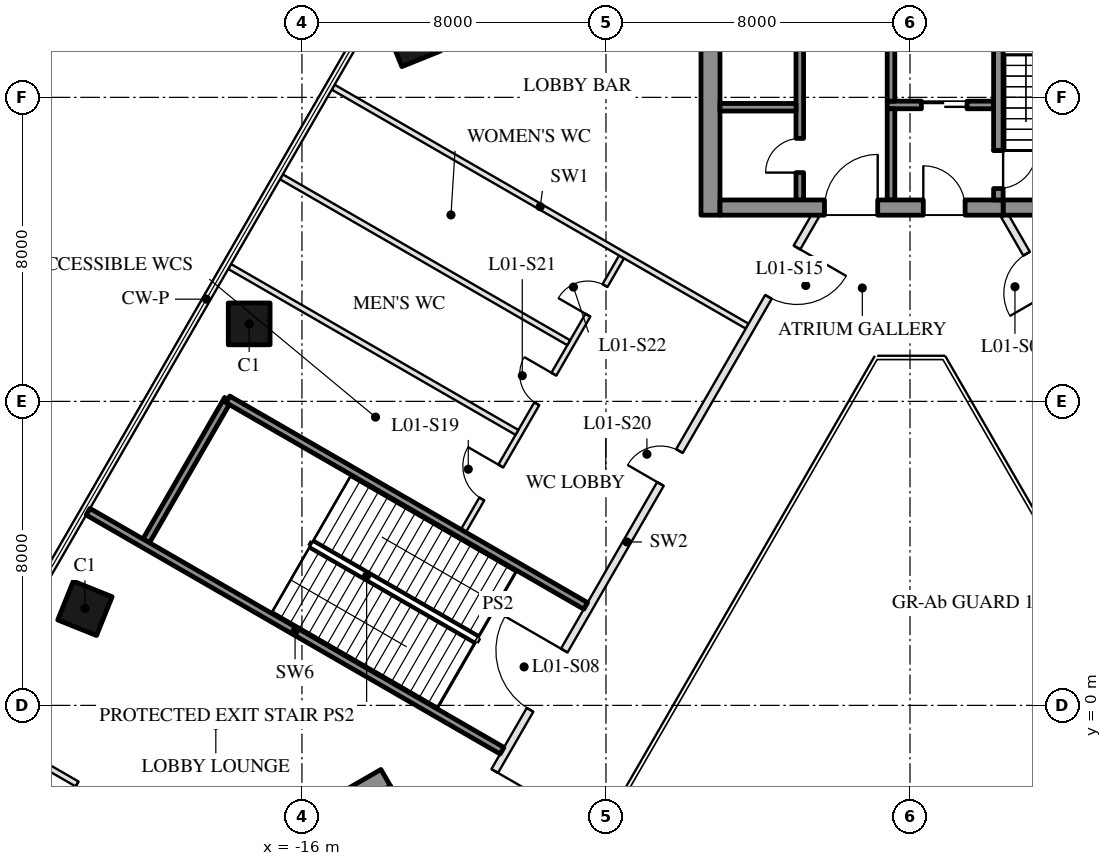
"""IFC4 building model, lengths in metres.
Left out: names, types, materials, properties, quantities, classifications, styles, units other than length and angle.
Written with IfcOpenShell. Run it as: python <this file> out.ifc"""

import sys

from ifc_helpers import new_model, si_unit, direction, frame, frame_2d, origin, origin_2d, place, context, subcontext, project, spatial, rectangle, hollow_rectangle, extrude, boolean, halfspace, element, fill, save


model = new_model("IFC4")
c1 = context("Model", 3, precision=1e-05, world=origin(), true_north=direction((0.0, 1.0)))
c2 = subcontext(c1, "Body", "Model", "MODEL_VIEW")
j1 = project(units=[si_unit("LENGTHUNIT", "METRE"), si_unit("PLANEANGLEUNIT", "RADIAN")], contexts=[c1])
p1 = place(None, origin())
s1 = spatial("IfcSite", under=j1, at=p1, CompositionType="ELEMENT")
p2 = place(p1, origin())
s2 = spatial("IfcBuilding", under=s1, at=p2, CompositionType="ELEMENT")
p3 = place(p2, frame((0.0, 0.0, 9.0)))
s3 = spatial("IfcBuildingStorey", under=s2, at=p3, CompositionType="ELEMENT", Elevation=9.0)
p4 = place(p3, frame((-13.066, 17.525, 0.0), z_axis=(0.075817777457, -0.096766445564, 0.992415195185), x_axis=(0.501683757676, 0.86383242032, 0.045901600061)))
e1 = element("IfcColumn", 1, at=p4, inside=s3, PredefinedType="COLUMN", context=c2, shape_type="SweptSolid", body=[
    boolean("DIFFERENCE", boolean("DIFFERENCE", extrude(hollow_rectangle(XDim=1.1, YDim=1.1, WallThickness=0.05, at=origin_2d()), origin(), (0.0, 0.0, 1.0), 6.55), halfspace(frame((0.0, 0.0, 0.017), z_axis=(0.0, 0.0, 1.0), x_axis=(1.0, 0.0, 0.0)), True)), halfspace(frame((0.0, 0.0, 6.534), z_axis=(0.0, 0.0, 1.0), x_axis=(1.0, 0.0, 0.0)), False)),
])
p5 = place(p3, frame((-17.388, 10.039, 0.0), z_axis=(0.098846347324, -0.057091321784, 0.993463628221), x_axis=(0.500071807692, 0.865983941567, 9.961389e-06)))
e2 = element("IfcColumn", 2, at=p5, inside=s3, PredefinedType="COLUMN", context=c2, shape_type="SweptSolid", body=[
    boolean("DIFFERENCE", boolean("DIFFERENCE", extrude(hollow_rectangle(XDim=1.1, YDim=1.1, WallThickness=0.05, at=origin_2d()), origin(), (0.0, 0.0, 1.0), 6.543), halfspace(frame((0.0, 0.0, 0.015), z_axis=(0.0, 0.0, 1.0), x_axis=(1.0, 0.0, 0.0)), True)), halfspace(frame((0.0, 0.0, 6.528), z_axis=(0.0, 0.0, 1.0), x_axis=(1.0, 0.0, 0.0)), False)),
])
p6 = place(p3, frame((-21.71, 2.553, 0.0), z_axis=(0.12170363311, -0.017295707738, 0.992415781909), x_axis=(-0.497292845598, -0.86636846087, 0.045885899002)))
e3 = element("IfcColumn", 3, at=p6, inside=s3, PredefinedType="COLUMN", context=c2, shape_type="SweptSolid", body=[
    boolean("DIFFERENCE", boolean("DIFFERENCE", extrude(hollow_rectangle(XDim=1.1, YDim=1.1, WallThickness=0.05, at=origin_2d()), origin(), (0.0, 0.0, 1.0), 6.55), halfspace(frame((0.0, 0.0, 0.017), z_axis=(0.0, 0.0, 1.0), x_axis=(1.0, 0.0, 0.0)), True)), halfspace(frame((0.0, 0.0, 6.534), z_axis=(0.0, 0.0, 1.0), x_axis=(1.0, 0.0, 0.0)), False)),
])
p7 = place(p3, frame((-5.25, 12.9, 0.0), z_axis=(0.0, 0.0, 1.0), x_axis=(0.0, 1.0, 0.0)))
e4 = element("IfcWall", 4, at=p7, inside=s3, PredefinedType="SHEAR", context=c2, shape_type="SweptSolid", body=[
    extrude(rectangle(XDim=15.6, YDim=0.5, at=frame_2d((7.8, 0.0))), origin(), (0.0, 0.0, 1.0), 6.15),
])
p8 = place(p3, frame((2.2, 15.8, 0.0), z_axis=(0.0, 0.0, 1.0), x_axis=(-1.0, 0.0, 0.0)))
e5 = element("IfcWall", 5, at=p8, inside=s3, PredefinedType="SHEAR", context=c2, shape_type="SweptSolid", body=[
    extrude(rectangle(XDim=2.8, YDim=0.2, at=frame_2d((1.4, 0.0))), origin(), (0.0, 0.0, 1.0), 6.15),
])
p9 = place(p8, frame((0.7, 0.0, 0.0)))
e6 = element("IfcOpeningElement", 6, at=p9, cuts=e5, PredefinedType="OPENING", context=c2, shape_type="SweptSolid", body=[
    extrude(rectangle(XDim=1.2, YDim=2.1, at=frame_2d((0.6, 1.05))), frame((0.0, 0.11, 0.0), z_axis=(0.0, -1.0, 0.0), x_axis=(1.0, 0.0, 0.0)), (0.0, 0.0, 1.0), 0.22),
])
p10 = place(p3, frame((-0.5, 15.9, 0.0), z_axis=(0.0, 0.0, 1.0), x_axis=(0.0, 1.0, 0.0)))
e7 = element("IfcWall", 7, at=p10, inside=s3, PredefinedType="SHEAR", context=c2, shape_type="SweptSolid", body=[
    extrude(rectangle(XDim=2.8, YDim=0.2, at=frame_2d((1.4, 0.0))), origin(), (0.0, 0.0, 1.0), 6.15),
])
p11 = place(p3, frame((-0.5, 13.3, 0.0), z_axis=(0.0, 0.0, 1.0), x_axis=(0.0, 1.0, 0.0)))
e8 = element("IfcWall", 8, at=p11, inside=s3, PredefinedType="SHEAR", context=c2, shape_type="SweptSolid", body=[
    extrude(rectangle(XDim=2.4, YDim=0.2, at=frame_2d((1.2, 0.0))), origin(), (0.0, 0.0, 1.0), 6.15),
])
p12 = place(p3, frame((-2.9, 13.3, 0.0), z_axis=(0.0, 0.0, 1.0), x_axis=(0.0, 1.0, 0.0)))
e9 = element("IfcWall", 9, at=p12, inside=s3, PredefinedType="SHEAR", context=c2, shape_type="SweptSolid", body=[
    extrude(rectangle(XDim=12.6, YDim=0.2, at=frame_2d((6.3, 0.0))), origin(), (0.0, 0.0, 1.0), 6.15),
])
p13 = place(p12, frame((0.72, 0.0, 0.0)))
e10 = element("IfcOpeningElement", 10, at=p13, cuts=e9, PredefinedType="OPENING", context=c2, shape_type="SweptSolid", body=[
    extrude(rectangle(XDim=0.9, YDim=2.1, at=frame_2d((0.45, 1.05))), frame((0.0, 0.11, 0.0), z_axis=(0.0, -1.0, 0.0), x_axis=(1.0, 0.0, 0.0)), (0.0, 0.0, 1.0), 0.22),
])
p14 = place(p12, frame((5.8, 0.0, 0.0)))
e11 = element("IfcOpeningElement", 11, at=p14, cuts=e9, PredefinedType="OPENING", context=c2, shape_type="SweptSolid", body=[
    extrude(rectangle(XDim=0.9, YDim=2.1, at=frame_2d((0.45, 1.05))), frame((0.0, 0.11, 0.0), z_axis=(0.0, -1.0, 0.0), x_axis=(1.0, 0.0, 0.0)), (0.0, 0.0, 1.0), 0.22),
])
p15 = place(p12, frame((10.51, 0.0, 0.0)))
e12 = element("IfcOpeningElement", 12, at=p15, cuts=e9, PredefinedType="OPENING", context=c2, shape_type="SweptSolid", body=[
    extrude(rectangle(XDim=0.9, YDim=2.1, at=frame_2d((0.45, 1.05))), frame((0.0, 0.11, 0.0), z_axis=(0.0, -1.0, 0.0), x_axis=(1.0, 0.0, 0.0)), (0.0, 0.0, 1.0), 0.22),
])
p16 = place(p3, frame((-3.0, 15.74, 0.0), z_axis=(0.0, 0.0, 1.0), x_axis=(-1.0, 0.0, 0.0)))
e13 = element("IfcWall", 13, at=p16, inside=s3, PredefinedType="SHEAR", context=c2, shape_type="SweptSolid", body=[
    extrude(rectangle(XDim=2.0, YDim=0.2, at=frame_2d((1.0, 0.0))), origin(), (0.0, 0.0, 1.0), 6.15),
])
p17 = place(p3, frame((5.0, 13.1, 0.0), z_axis=(0.0, 0.0, 1.0), x_axis=(-1.0, 0.0, 0.0)))
e14 = element("IfcWall", 14, at=p17, inside=s3, PredefinedType="SHEAR", context=c2, shape_type="SweptSolid", body=[
    extrude(rectangle(XDim=2.55, YDim=0.4, at=frame_2d((1.275, 0.0))), origin(), (0.0, 0.0, 1.0), 6.15),
])
p18 = place(p3, frame((2.45, 13.1, 0.0), z_axis=(0.0, 0.0, 1.0), x_axis=(-1.0, 0.0, 0.0)))
e15 = element("IfcWall", 15, at=p18, inside=s3, PredefinedType="SHEAR", context=c2, shape_type="SweptSolid", body=[
    extrude(rectangle(XDim=7.45, YDim=0.4, at=frame_2d((3.725, 0.0))), origin(), (0.0, 0.0, 1.0), 6.15),
])
p19 = place(p18, frame((1.0, 0.0, 0.0)))
e16 = element("IfcOpeningElement", 16, at=p19, cuts=e15, PredefinedType="OPENING", context=c2, shape_type="SweptSolid", body=[
    extrude(rectangle(XDim=1.1, YDim=2.1, at=frame_2d((0.55, 1.05))), frame((0.0, 0.21, 0.0), z_axis=(0.0, -1.0, 0.0), x_axis=(1.0, 0.0, 0.0)), (0.0, 0.0, 1.0), 0.42),
])
p20 = place(p18, frame((3.3, 0.0, 0.0)))
e17 = element("IfcOpeningElement", 17, at=p20, cuts=e15, PredefinedType="OPENING", context=c2, shape_type="SweptSolid", body=[
    extrude(rectangle(XDim=1.4, YDim=2.1, at=frame_2d((0.7, 1.05))), frame((0.0, 0.21, 0.0), z_axis=(0.0, -1.0, 0.0), x_axis=(1.0, 0.0, 0.0)), (0.0, 0.0, 1.0), 0.42),
])
p21 = place(p3, frame((2.325, 13.3, 0.0), z_axis=(0.0, 0.0, 1.0), x_axis=(0.0, 1.0, 0.0)))
e18 = element("IfcWall", 18, at=p21, inside=s3, PredefinedType="SHEAR", context=c2, shape_type="SweptSolid", body=[
    extrude(rectangle(XDim=1.306, YDim=0.25, at=frame_2d((0.653, 0.0))), origin(), (0.0, 0.0, 1.0), 6.15),
])
p22 = place(p21, frame((0.3, 0.0, 0.0)))
e19 = element("IfcOpeningElement", 19, at=p22, cuts=e18, PredefinedType="OPENING", context=c2, shape_type="SweptSolid", body=[
    extrude(rectangle(XDim=1.0, YDim=2.1, at=frame_2d((0.5, 1.05))), frame((0.0, 0.135, 0.0), z_axis=(0.0, -1.0, 0.0), x_axis=(1.0, 0.0, 0.0)), (0.0, 0.0, 1.0), 0.27),
])
p23 = place(p3, frame((2.325, 14.606, 0.0), z_axis=(0.0, 0.0, 1.0), x_axis=(0.0, 1.0, 0.0)))
e20 = element("IfcWall", 20, at=p23, inside=s3, PredefinedType="SHEAR", context=c2, shape_type="SweptSolid", body=[
    extrude(rectangle(XDim=5.144, YDim=0.25, at=frame_2d((2.572, 0.0))), origin(), (0.0, 0.0, 1.0), 6.15),
])
p24 = place(p3, frame((-13.797, -1.903, 0.0), z_axis=(0.0, 0.0, 1.0), x_axis=(-0.866033076574, -0.499986710104, 0.0)))
e21 = element("IfcWall", 21, at=p24, inside=s3, PredefinedType="SHEAR", context=c2, shape_type="SweptSolid", body=[
    extrude(rectangle(XDim=1.706, YDim=0.5, at=frame_2d((0.853, 0.0))), origin(), (0.0, 0.0, 1.0), 6.15),
])
p25 = place(p3, frame((12.413, -4.3, 0.0), z_axis=(0.0, 0.0, 1.0), x_axis=(-0.50000478328, 0.866022642139, 0.0)))
e22 = element("IfcWall", 22, at=p25, inside=s3, PredefinedType="PARTITIONING", context=c2, shape_type="SweptSolid", body=[
    extrude(rectangle(XDim=19.861, YDim=0.2, at=frame_2d((9.931, 0.0))), origin(), (0.0, 0.0, 1.0), 5.36),
])
p26 = place(p25, frame((1.342, 0.0, 0.0)))
e23 = element("IfcOpeningElement", 23, at=p26, cuts=e22, PredefinedType="OPENING", context=c2, shape_type="SweptSolid", body=[
    extrude(rectangle(XDim=1.8, YDim=2.4, at=frame_2d((0.9, 1.2))), frame((0.0, 0.11, 0.0), z_axis=(0.0, -1.0, 0.0), x_axis=(1.0, 0.0, 0.0)), (0.0, 0.0, 1.0), 0.22),
])
p27 = place(p25, frame((5.825, 0.0, 0.0)))
e24 = element("IfcOpeningElement", 24, at=p27, cuts=e22, PredefinedType="OPENING", context=c2, shape_type="SweptSolid", body=[
    extrude(rectangle(XDim=1.8, YDim=2.4, at=frame_2d((0.9, 1.2))), frame((0.0, 0.11, 0.0), z_axis=(0.0, -1.0, 0.0), x_axis=(1.0, 0.0, 0.0)), (0.0, 0.0, 1.0), 0.22),
])
p28 = place(p25, frame((9.818, 0.0, 0.0)))
e25 = element("IfcOpeningElement", 25, at=p28, cuts=e22, PredefinedType="OPENING", context=c2, shape_type="SweptSolid", body=[
    extrude(rectangle(XDim=1.2, YDim=2.1, at=frame_2d((0.6, 1.05))), frame((0.0, 0.11, 0.0), z_axis=(0.0, -1.0, 0.0), x_axis=(1.0, 0.0, 0.0)), (0.0, 0.0, 1.0), 0.22),
])
p29 = place(p25, frame((17.49, 0.0, 0.0)))
e26 = element("IfcOpeningElement", 26, at=p29, cuts=e22, PredefinedType="OPENING", context=c2, shape_type="SweptSolid", body=[
    extrude(rectangle(XDim=1.2, YDim=2.1, at=frame_2d((0.6, 1.05))), frame((0.0, 0.11, 0.0), z_axis=(0.0, -1.0, 0.0), x_axis=(1.0, 0.0, 0.0)), (0.0, 0.0, 1.0), 0.22),
])
p30 = place(p25, frame((13.23, 0.0, 0.0)))
e27 = element("IfcOpeningElement", 27, at=p30, cuts=e22, PredefinedType="OPENING", context=c2, shape_type="SweptSolid", body=[
    extrude(rectangle(XDim=1.8, YDim=2.1, at=frame_2d((0.9, 1.05))), frame((0.0, 0.11, 0.0), z_axis=(0.0, -1.0, 0.0), x_axis=(1.0, 0.0, 0.0)), (0.0, 0.0, 1.0), 0.22),
])
p31 = place(p3, frame((-17.948, 8.053, 0.0), z_axis=(0.0, 0.0, 1.0), x_axis=(-0.500028799954, -0.866008775485, 0.0)))
e28 = element("IfcWall", 28, at=p31, inside=s3, PredefinedType="SOLIDWALL", context=c2, shape_type="SweptSolid", body=[
    extrude(rectangle(XDim=4.3, YDim=0.2, at=frame_2d((2.15, 0.0))), origin(), (0.0, 0.0, 1.0), 6.15),
])
p32 = place(p3, frame((-7.59, 11.801, 0.0), z_axis=(0.0, 0.0, 1.0), x_axis=(-0.500005920892, -0.866021985329, 0.0)))
e29 = element("IfcWall", 29, at=p32, inside=s3, PredefinedType="PARTITIONING", context=c2, shape_type="SweptSolid", body=[
    extrude(rectangle(XDim=8.325, YDim=0.15, at=frame_2d((4.163, 0.0))), origin(), (0.0, 0.0, 1.0), 5.36),
])
p33 = place(p32, frame((6.354, 0.0, 0.0)))
e30 = element("IfcOpeningElement", 30, at=p33, cuts=e29, PredefinedType="OPENING", context=c2, shape_type="SweptSolid", body=[
    extrude(rectangle(XDim=1.0, YDim=2.1, at=frame_2d((0.5, 1.05))), frame((0.0, 0.085, 0.0), z_axis=(0.0, -1.0, 0.0), x_axis=(1.0, 0.0, 0.0)), (0.0, 0.0, 1.0), 0.17),
])
p34 = place(p32, frame((3.562, 0.0, 0.0)))
e31 = element("IfcOpeningElement", 31, at=p34, cuts=e29, PredefinedType="OPENING", context=c2, shape_type="SweptSolid", body=[
    extrude(rectangle(XDim=0.9, YDim=2.1, at=frame_2d((0.45, 1.05))), frame((0.0, 0.085, 0.0), z_axis=(0.0, -1.0, 0.0), x_axis=(1.0, 0.0, 0.0)), (0.0, 0.0, 1.0), 0.17),
])
p35 = place(p32, frame((0.871, 0.0, 0.0)))
e32 = element("IfcOpeningElement", 32, at=p35, cuts=e29, PredefinedType="OPENING", context=c2, shape_type="SweptSolid", body=[
    extrude(rectangle(XDim=0.9, YDim=2.1, at=frame_2d((0.45, 1.05))), frame((0.0, 0.085, 0.0), z_axis=(0.0, -1.0, 0.0), x_axis=(1.0, 0.0, 0.0)), (0.0, 0.0, 1.0), 0.17),
])
p36 = place(p3, frame((-15.177, 16.268, 0.0), z_axis=(0.0, 0.0, 1.0), x_axis=(0.866027204995, -0.499996880198, 0.0)))
e33 = element("IfcWall", 33, at=p36, inside=s3, PredefinedType="PARTITIONING", context=c2, shape_type="SweptSolid", body=[
    extrude(rectangle(XDim=12.578, YDim=0.15, at=frame_2d((6.289, 0.0))), origin(), (0.0, 0.0, 1.0), 5.55),
])
for number, where, z_axis, x_axis in (
    (34, (-16.54, 13.908, 0.0), (0.0, 0.0, 1.0), (0.866, -0.5, 0.0)),
    (35, (-17.903, 11.549, 0.0), (0.0, 0.0, 1.0), (0.866, -0.5, 0.0)),
):
    element("IfcWall", number, at=place(p3, frame(where, z_axis=z_axis, x_axis=x_axis)), inside=s3, PredefinedType="PARTITIONING", context=c2, shape_type="SweptSolid", body=[
        extrude(rectangle(XDim=8.73, YDim=0.15, at=frame_2d((4.365, 0.0))), origin(), (0.0, 0.0, 1.0), 5.55),
    ])
p37 = place(p3, frame((-17.948, 8.053, 0.0), z_axis=(0.0, 0.0, 1.0), x_axis=(0.86602026553, -0.500008899612, 0.0)))
e36 = element("IfcWall", 36, at=p37, inside=s3, PredefinedType="SOLIDWALL", context=c2, shape_type="SweptSolid", body=[
    extrude(rectangle(XDim=10.87, YDim=0.2, at=frame_2d((5.435, 0.0))), origin(), (0.0, 0.0, 1.0), 6.15),
])
p38 = place(p3, frame((-21.628, 5.097, 0.0), z_axis=(0.0, 0.0, 1.0), x_axis=(0.866023652799, -0.500003032783, 0.0)))
e37 = element("IfcWall", 37, at=p38, inside=s3, PredefinedType="SOLIDWALL", context=c2, shape_type="SweptSolid", body=[
    extrude(rectangle(XDim=12.579, YDim=0.2, at=frame_2d((6.289, 0.0))), origin(), (0.0, 0.0, 1.0), 6.15),
])
p39 = place(p3, frame((-24.802, -0.403, 0.0), z_axis=(0.0, 0.0, 1.0), x_axis=(0.866018471794, -0.500012006368, 0.0)))
e38 = element("IfcWall", 38, at=p39, inside=s3, PredefinedType="PARTITIONING", context=c2, shape_type="SweptSolid", body=[
    extrude(rectangle(XDim=7.566, YDim=0.15, at=frame_2d((3.783, 0.0))), origin(), (0.0, 0.0, 1.0), 5.55),
])
p40 = place(p39, frame((3.333, 0.0, 0.0)))
e39 = element("IfcOpeningElement", 39, at=p40, cuts=e38, PredefinedType="OPENING", context=c2, shape_type="SweptSolid", body=[
    extrude(rectangle(XDim=0.9, YDim=2.1, at=frame_2d((0.45, 1.05))), frame((0.0, 0.085, 0.0), z_axis=(0.0, -1.0, 0.0), x_axis=(1.0, 0.0, 0.0)), (0.0, 0.0, 1.0), 0.17),
])
p41 = place(p3, frame((-2.482, 12.9, 0.0), z_axis=(0.0, 0.0, 1.0), x_axis=(-0.50000478328, -0.866022642139, 0.0)))
e40 = element("IfcWall", 40, at=p41, inside=s3, PredefinedType="PARTITIONING", context=c2, shape_type="SweptSolid", body=[
    extrude(rectangle(XDim=19.861, YDim=0.2, at=frame_2d((9.931, 0.0))), origin(), (0.0, 0.0, 1.0), 5.36),
])
p42 = place(p41, frame((13.23, 0.0, 0.0)))
e41 = element("IfcOpeningElement", 41, at=p42, cuts=e40, PredefinedType="OPENING", context=c2, shape_type="SweptSolid", body=[
    extrude(rectangle(XDim=1.8, YDim=2.1, at=frame_2d((0.9, 1.05))), frame((0.0, 0.11, 0.0), z_axis=(0.0, -1.0, 0.0), x_axis=(1.0, 0.0, 0.0)), (0.0, 0.0, 1.0), 0.22),
])
p43 = place(p41, frame((0.984, 0.0, 0.0)))
e42 = element("IfcOpeningElement", 42, at=p43, cuts=e40, PredefinedType="OPENING", context=c2, shape_type="SweptSolid", body=[
    extrude(rectangle(XDim=1.5, YDim=2.1, at=frame_2d((0.75, 1.05))), frame((0.0, 0.11, 0.0), z_axis=(0.0, -1.0, 0.0), x_axis=(1.0, 0.0, 0.0)), (0.0, 0.0, 1.0), 0.22),
])
p44 = place(p41, frame((16.89, 0.0, 0.0)))
e43 = element("IfcOpeningElement", 43, at=p44, cuts=e40, PredefinedType="OPENING", context=c2, shape_type="SweptSolid", body=[
    extrude(rectangle(XDim=1.8, YDim=2.4, at=frame_2d((0.9, 1.2))), frame((0.0, 0.11, 0.0), z_axis=(0.0, -1.0, 0.0), x_axis=(1.0, 0.0, 0.0)), (0.0, 0.0, 1.0), 0.22),
])
p45 = place(p41, frame((7.168, 0.0, 0.0)))
e44 = element("IfcOpeningElement", 44, at=p45, cuts=e40, PredefinedType="OPENING", context=c2, shape_type="SweptSolid", body=[
    extrude(rectangle(XDim=1.0, YDim=2.1, at=frame_2d((0.5, 1.05))), frame((0.0, 0.11, 0.0), z_axis=(0.0, -1.0, 0.0), x_axis=(1.0, 0.0, 0.0)), (0.0, 0.0, 1.0), 0.22),
])
p46 = place(p9, origin())
e45 = element("IfcDoor", 45, at=p46, inside=s3, OperationType="DOUBLE_DOOR_SLIDING", PredefinedType="DOOR", context=c2, shape_type="SweptSolid", body=[
    extrude(rectangle(XDim=1.2, YDim=2.1, at=frame_2d((0.6, 1.05))), frame((0.0, 0.025, 0.0), z_axis=(0.0, -1.0, 0.0), x_axis=(1.0, 0.0, 0.0)), (0.0, 0.0, 1.0), 0.05),
])
fill(e6, e45)
p47 = place(p13, origin())
e46 = element("IfcDoor", 46, at=p47, inside=s3, OperationType="SINGLE_SWING_LEFT", PredefinedType="DOOR", context=c2, shape_type="SweptSolid", body=[
    extrude(rectangle(XDim=0.9, YDim=2.1, at=frame_2d((0.45, 1.05))), frame((0.0, 0.025, 0.0), z_axis=(0.0, -1.0, 0.0), x_axis=(1.0, 0.0, 0.0)), (0.0, 0.0, 1.0), 0.05),
])
fill(e10, e46)
p48 = place(p19, frame((1.1, 0.0, 0.0), z_axis=(0.0, 0.0, 1.0), x_axis=(-1.0, 0.0, 0.0)))
e47 = element("IfcDoor", 47, at=p48, inside=s3, OperationType="SINGLE_SWING_LEFT", PredefinedType="DOOR", context=c2, shape_type="SweptSolid", body=[
    extrude(rectangle(XDim=1.1, YDim=2.1, at=frame_2d((0.55, 1.05))), frame((0.0, 0.025, 0.0), z_axis=(0.0, -1.0, 0.0), x_axis=(1.0, 0.0, 0.0)), (0.0, 0.0, 1.0), 0.05),
])
fill(e16, e47)
p49 = place(p20, frame((1.4, 0.0, 0.0), z_axis=(0.0, 0.0, 1.0), x_axis=(-1.0, 0.0, 0.0)))
e48 = element("IfcDoor", 48, at=p49, inside=s3, OperationType="DOUBLE_DOOR_SINGLE_SWING", PredefinedType="DOOR", context=c2, shape_type="SweptSolid", body=[
    extrude(rectangle(XDim=1.4, YDim=2.1, at=frame_2d((0.7, 1.05))), frame((0.0, 0.025, 0.0), z_axis=(0.0, -1.0, 0.0), x_axis=(1.0, 0.0, 0.0)), (0.0, 0.0, 1.0), 0.05),
])
fill(e17, e48)
p50 = place(p22, frame((1.0, 0.0, 0.0), z_axis=(0.0, 0.0, 1.0), x_axis=(-1.0, 0.0, 0.0)))
e49 = element("IfcDoor", 49, at=p50, inside=s3, OperationType="SINGLE_SWING_LEFT", PredefinedType="DOOR", context=c2, shape_type="SweptSolid", body=[
    extrude(rectangle(XDim=1.0, YDim=2.1, at=frame_2d((0.5, 1.05))), frame((0.0, 0.025, 0.0), z_axis=(0.0, -1.0, 0.0), x_axis=(1.0, 0.0, 0.0)), (0.0, 0.0, 1.0), 0.05),
])
fill(e19, e49)
p51 = place(p29, origin())
e50 = element("IfcDoor", 50, at=p51, inside=s3, OperationType="SINGLE_SWING_LEFT", PredefinedType="DOOR", context=c2, shape_type="SweptSolid", body=[
    extrude(rectangle(XDim=1.2, YDim=2.1, at=frame_2d((0.6, 1.05))), frame((0.0, 0.025, 0.0), z_axis=(0.0, -1.0, 0.0), x_axis=(1.0, 0.0, 0.0)), (0.0, 0.0, 1.0), 0.05),
])
fill(e26, e50)
p52 = place(p42, frame((1.8, 0.0, 0.0), z_axis=(0.0, 0.0, 1.0), x_axis=(-1.0, 0.0, 0.0)))
e51 = element("IfcDoor", 51, at=p52, inside=s3, OperationType="DOUBLE_DOOR_SINGLE_SWING", PredefinedType="DOOR", context=c2, shape_type="SweptSolid", body=[
    extrude(rectangle(XDim=1.8, YDim=2.1, at=frame_2d((0.9, 1.05))), frame((0.0, 0.025, 0.0), z_axis=(0.0, -1.0, 0.0), x_axis=(1.0, 0.0, 0.0)), (0.0, 0.0, 1.0), 0.05),
])
fill(e41, e51)
p53 = place(p43, origin())
e52 = element("IfcDoor", 52, at=p53, inside=s3, OperationType="DOUBLE_DOOR_SINGLE_SWING", PredefinedType="DOOR", context=c2, shape_type="SweptSolid", body=[
    extrude(rectangle(XDim=1.5, YDim=2.1, at=frame_2d((0.75, 1.05))), frame((0.0, 0.025, 0.0), z_axis=(0.0, -1.0, 0.0), x_axis=(1.0, 0.0, 0.0)), (0.0, 0.0, 1.0), 0.05),
])
fill(e42, e52)
p54 = place(p44, origin())
e53 = element("IfcDoor", 53, at=p54, inside=s3, OperationType="DOUBLE_DOOR_SINGLE_SWING", PredefinedType="DOOR", context=c2, shape_type="SweptSolid", body=[
    extrude(rectangle(XDim=1.8, YDim=2.4, at=frame_2d((0.9, 1.2))), frame((0.0, 0.025, 0.0), z_axis=(0.0, -1.0, 0.0), x_axis=(1.0, 0.0, 0.0)), (0.0, 0.0, 1.0), 0.05),
])
fill(e43, e53)
p55 = place(p40, frame((0.9, 0.0, 0.0), z_axis=(0.0, 0.0, 1.0), x_axis=(-1.0, 0.0, 0.0)))
e54 = element("IfcDoor", 54, at=p55, inside=s3, OperationType="SINGLE_SWING_RIGHT", PredefinedType="DOOR", context=c2, shape_type="SweptSolid", body=[
    extrude(rectangle(XDim=0.9, YDim=2.1, at=frame_2d((0.45, 1.05))), frame((0.0, 0.025, 0.0), z_axis=(0.0, -1.0, 0.0), x_axis=(1.0, 0.0, 0.0)), (0.0, 0.0, 1.0), 0.05),
])
fill(e39, e54)
p56 = place(p33, frame((1.0, 0.0, 0.0), z_axis=(0.0, 0.0, 1.0), x_axis=(-1.0, 0.0, 0.0)))
e55 = element("IfcDoor", 55, at=p56, inside=s3, OperationType="SINGLE_SWING_RIGHT", PredefinedType="DOOR", context=c2, shape_type="SweptSolid", body=[
    extrude(rectangle(XDim=1.0, YDim=2.1, at=frame_2d((0.5, 1.05))), frame((0.0, 0.025, 0.0), z_axis=(0.0, -1.0, 0.0), x_axis=(1.0, 0.0, 0.0)), (0.0, 0.0, 1.0), 0.05),
])
fill(e30, e55)
p57 = place(p45, frame((1.0, 0.0, 0.0), z_axis=(0.0, 0.0, 1.0), x_axis=(-1.0, 0.0, 0.0)))
e56 = element("IfcDoor", 56, at=p57, inside=s3, OperationType="SINGLE_SWING_LEFT", PredefinedType="DOOR", context=c2, shape_type="SweptSolid", body=[
    extrude(rectangle(XDim=1.0, YDim=2.1, at=frame_2d((0.5, 1.05))), frame((0.0, 0.025, 0.0), z_axis=(0.0, -1.0, 0.0), x_axis=(1.0, 0.0, 0.0)), (0.0, 0.0, 1.0), 0.05),
])
fill(e44, e56)
p58 = place(p34, frame((0.9, 0.0, 0.0), z_axis=(0.0, 0.0, 1.0), x_axis=(-1.0, 0.0, 0.0)))
e57 = element("IfcDoor", 57, at=p58, inside=s3, OperationType="SINGLE_SWING_RIGHT", PredefinedType="DOOR", context=c2, shape_type="SweptSolid", body=[
    extrude(rectangle(XDim=0.9, YDim=2.1, at=frame_2d((0.45, 1.05))), frame((0.0, 0.025, 0.0), z_axis=(0.0, -1.0, 0.0), x_axis=(1.0, 0.0, 0.0)), (0.0, 0.0, 1.0), 0.05),
])
fill(e31, e57)
p59 = place(p35, frame((0.9, 0.0, 0.0), z_axis=(0.0, 0.0, 1.0), x_axis=(-1.0, 0.0, 0.0)))
e58 = element("IfcDoor", 58, at=p59, inside=s3, OperationType="SINGLE_SWING_LEFT", PredefinedType="DOOR", context=c2, shape_type="SweptSolid", body=[
    extrude(rectangle(XDim=0.9, YDim=2.1, at=frame_2d((0.45, 1.05))), frame((0.0, 0.025, 0.0), z_axis=(0.0, -1.0, 0.0), x_axis=(1.0, 0.0, 0.0)), (0.0, 0.0, 1.0), 0.05),
])
fill(e32, e58)
save(model, sys.argv[1])
